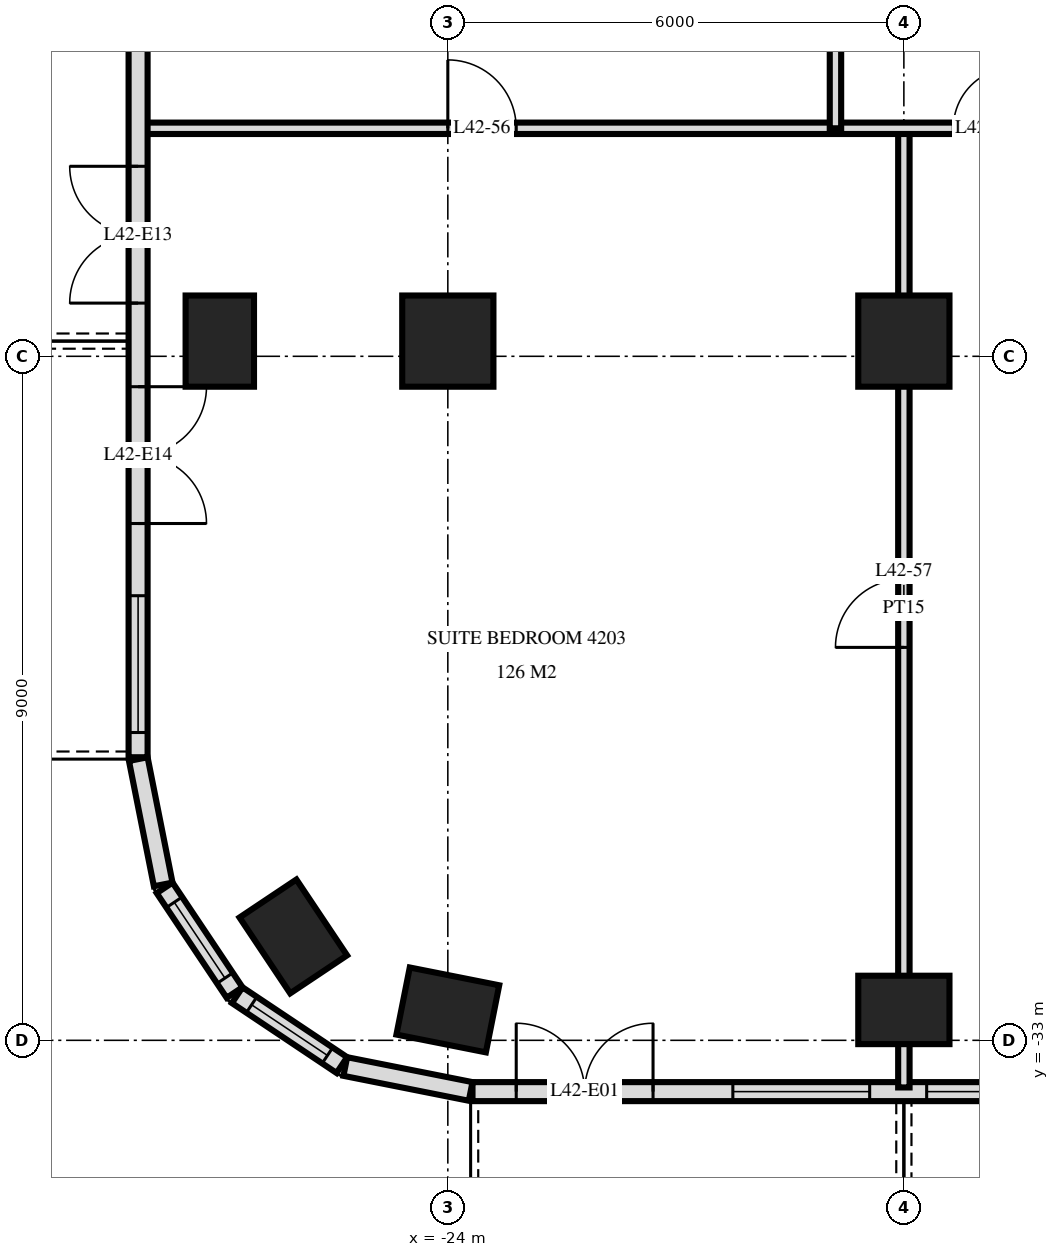
"""IFC4 building model, lengths in metres.
Left out: names, types, materials, properties, quantities, classifications, styles, units other than length and angle.
Written with IfcOpenShell. Run it as: python <this file> out.ifc"""

import sys

from ifc_helpers import new_model, si_unit, direction, frame, frame_2d, origin, origin_2d, place, context, subcontext, project, spatial, rectangle, extrude, element, fill, save


model = new_model("IFC4")
c1 = context("Model", 3, precision=1e-05, world=origin(), true_north=direction((0.0, 1.0)))
c2 = subcontext(c1, "Body", "Model", "MODEL_VIEW")
j1 = project(units=[si_unit("LENGTHUNIT", "METRE"), si_unit("PLANEANGLEUNIT", "RADIAN")], contexts=[c1])
p1 = place(None, origin())
s1 = spatial("IfcSite", under=j1, at=p1, CompositionType="ELEMENT")
p2 = place(p1, origin())
s2 = spatial("IfcBuilding", under=s1, at=p2, CompositionType="ELEMENT")
p3 = place(p2, frame((0.0, 0.0, 163.2)))
s3 = spatial("IfcBuildingStorey", under=s2, at=p3, CompositionType="ELEMENT", Elevation=163.2)
for number, where, z_axis, x_axis in (
    (1, (-27.0, -23.8, 0.0), (0.0, 0.0, 1.0), (0.0, 1.0, 0.0)),
    (2, (-26.033, -31.633, 0.0), (0.0, 0.0, 1.0), (-0.556, 0.831, 0.0)),
    (3, (-24.0, -32.6, 0.0), (0.0, 0.0, 1.0), (-0.981, 0.195, 0.0)),
):
    element("IfcColumn", number, at=place(p3, frame(where, z_axis=z_axis, x_axis=x_axis)), inside=s3, PredefinedType="COLUMN", context=c2, shape_type="SweptSolid", body=[
        extrude(rectangle(XDim=1.2, YDim=0.9, at=origin_2d()), origin(), (0.0, 0.0, 1.0), 3.6),
    ])
p4 = place(p3, frame((-24.0, -23.8, 0.0), z_axis=(0.0, 0.0, 1.0), x_axis=(1.0, 0.0, 0.0)))
e4 = element("IfcColumn", 4, at=p4, inside=s3, PredefinedType="COLUMN", context=c2, shape_type="SweptSolid", body=[
    extrude(rectangle(XDim=1.2, YDim=1.2, at=origin_2d()), origin(), (0.0, 0.0, 1.0), 3.6),
])
p5 = place(p3, frame((-18.0, -32.6, 0.0), z_axis=(0.0, 0.0, 1.0), x_axis=(1.0, 0.0, 0.0)))
e5 = element("IfcColumn", 5, at=p5, inside=s3, PredefinedType="COLUMN", context=c2, shape_type="SweptSolid", body=[
    extrude(rectangle(XDim=1.2, YDim=0.9, at=origin_2d()), origin(), (0.0, 0.0, 1.0), 3.6),
])
p6 = place(p3, frame((-18.0, -23.8, 0.0), z_axis=(0.0, 0.0, 1.0), x_axis=(1.0, 0.0, 0.0)))
e6 = element("IfcColumn", 6, at=p6, inside=s3, PredefinedType="COLUMN", context=c2, shape_type="SweptSolid", body=[
    extrude(rectangle(XDim=1.2, YDim=1.2, at=origin_2d()), origin(), (0.0, 0.0, 1.0), 3.6),
])
p7 = place(p3, frame((-28.075, -3.325, 0.0), z_axis=(0.0, 0.0, 1.0), x_axis=(0.0, -1.0, 0.0)))
e7 = element("IfcWall", 7, at=p7, inside=s3, PredefinedType="SOLIDWALL", context=c2, shape_type="SweptSolid", body=[
    extrude(rectangle(XDim=25.951, YDim=0.25, at=frame_2d((12.975, 0.0))), origin(), (0.0, 0.0, 1.0), 3.32),
])
p8 = place(p7, frame((6.65, 0.0, 0.0)))
e8 = element("IfcOpeningElement", 8, at=p8, cuts=e7, PredefinedType="OPENING", context=c2, shape_type="SweptSolid", body=[
    extrude(rectangle(XDim=1.8, YDim=2.4, at=frame_2d((0.9, 1.2))), frame((0.0, 0.135, 0.0), z_axis=(0.0, -1.0, 0.0), x_axis=(1.0, 0.0, 0.0)), (0.0, 0.0, 1.0), 0.27),
])
p9 = place(p7, frame((12.575, 0.0, 0.3)))
e9 = element("IfcOpeningElement", 9, at=p9, cuts=e7, PredefinedType="OPENING", context=c2, shape_type="SweptSolid", body=[
    extrude(rectangle(XDim=1.2, YDim=2.1, at=frame_2d((0.6, 1.05))), frame((0.0, 0.135, 0.0), z_axis=(0.0, -1.0, 0.0), x_axis=(1.0, 0.0, 0.0)), (0.0, 0.0, 1.0), 0.27),
])
p10 = place(p7, frame((18.175, 0.0, 0.0)))
e10 = element("IfcOpeningElement", 10, at=p10, cuts=e7, PredefinedType="OPENING", context=c2, shape_type="SweptSolid", body=[
    extrude(rectangle(XDim=1.8, YDim=2.4, at=frame_2d((0.9, 1.2))), frame((0.0, 0.135, 0.0), z_axis=(0.0, -1.0, 0.0), x_axis=(1.0, 0.0, 0.0)), (0.0, 0.0, 1.0), 0.27),
])
p11 = place(p7, frame((21.075, 0.0, 0.0)))
e11 = element("IfcOpeningElement", 11, at=p11, cuts=e7, PredefinedType="OPENING", context=c2, shape_type="SweptSolid", body=[
    extrude(rectangle(XDim=1.8, YDim=2.4, at=frame_2d((0.9, 1.2))), frame((0.0, 0.135, 0.0), z_axis=(0.0, -1.0, 0.0), x_axis=(1.0, 0.0, 0.0)), (0.0, 0.0, 1.0), 0.27),
])
p12 = place(p7, frame((23.825, 0.0, 0.3)))
e12 = element("IfcOpeningElement", 12, at=p12, cuts=e7, PredefinedType="OPENING", context=c2, shape_type="SweptSolid", body=[
    extrude(rectangle(XDim=1.8, YDim=2.1, at=frame_2d((0.9, 1.05))), frame((0.0, 0.135, 0.0), z_axis=(0.0, -1.0, 0.0), x_axis=(1.0, 0.0, 0.0)), (0.0, 0.0, 1.0), 0.27),
])
p13 = place(p3, frame((-28.073, -29.3, 0.0), z_axis=(0.0, 0.0, 1.0), x_axis=(0.194999110559, -0.980803419081, 0.0)))
e13 = element("IfcWall", 13, at=p13, inside=s3, PredefinedType="SOLIDWALL", context=c2, shape_type="SweptSolid", body=[
    extrude(rectangle(XDim=1.681, YDim=0.25, at=frame_2d((0.841, 0.0))), origin(), (0.0, 0.0, 1.0), 3.32),
])
p14 = place(p3, frame((-27.726, -30.994, 0.0), z_axis=(0.0, 0.0, 1.0), x_axis=(0.55555029066, -0.831482937015, 0.0)))
e14 = element("IfcWall", 14, at=p14, inside=s3, PredefinedType="SOLIDWALL", context=c2, shape_type="SweptSolid", body=[
    extrude(rectangle(XDim=1.656, YDim=0.25, at=frame_2d((0.828, 0.0))), origin(), (0.0, 0.0, 1.0), 3.32),
])
p15 = place(p14, frame((0.228, 0.0, 0.9)))
e15 = element("IfcOpeningElement", 15, at=p15, cuts=e14, PredefinedType="OPENING", context=c2, shape_type="SweptSolid", body=[
    extrude(rectangle(XDim=1.2, YDim=1.5, at=frame_2d((0.6, 0.75))), frame((0.0, 0.135, 0.0), z_axis=(0.0, -1.0, 0.0), x_axis=(1.0, 0.0, 0.0)), (0.0, 0.0, 1.0), 0.27),
])
p16 = place(p3, frame((-26.771, -32.406, 0.0), z_axis=(0.0, 0.0, 1.0), x_axis=(0.831482937015, -0.55555029066, 0.0)))
e16 = element("IfcWall", 16, at=p16, inside=s3, PredefinedType="SOLIDWALL", context=c2, shape_type="SweptSolid", body=[
    extrude(rectangle(XDim=1.656, YDim=0.25, at=frame_2d((0.828, 0.0))), origin(), (0.0, 0.0, 1.0), 3.32),
])
p17 = place(p16, frame((0.228, 0.0, 0.9)))
e17 = element("IfcOpeningElement", 17, at=p17, cuts=e16, PredefinedType="OPENING", context=c2, shape_type="SweptSolid", body=[
    extrude(rectangle(XDim=1.2, YDim=1.5, at=frame_2d((0.6, 0.75))), frame((0.0, 0.135, 0.0), z_axis=(0.0, -1.0, 0.0), x_axis=(1.0, 0.0, 0.0)), (0.0, 0.0, 1.0), 0.27),
])
p18 = place(p3, frame((-25.349, -33.344, 0.0), z_axis=(0.0, 0.0, 1.0), x_axis=(0.980775640221, -0.19513878023, 0.0)))
e18 = element("IfcWall", 18, at=p18, inside=s3, PredefinedType="SOLIDWALL", context=c2, shape_type="SweptSolid", body=[
    extrude(rectangle(XDim=1.681, YDim=0.25, at=frame_2d((0.841, 0.0))), origin(), (0.0, 0.0, 1.0), 3.32),
])
p19 = place(p3, frame((-23.675, -33.675, 0.0), z_axis=(0.0, 0.0, 1.0), x_axis=(1.0, 0.0, 0.0)))
e19 = element("IfcWall", 19, at=p19, inside=s3, PredefinedType="SOLIDWALL", context=c2, shape_type="SweptSolid", body=[
    extrude(rectangle(XDim=47.351, YDim=0.25, at=frame_2d((23.675, 0.0))), origin(), (0.0, 0.0, 1.0), 3.32),
])
p20 = place(p19, frame((0.575, 0.0, 0.0)))
e20 = element("IfcOpeningElement", 20, at=p20, cuts=e19, PredefinedType="OPENING", context=c2, shape_type="SweptSolid", body=[
    extrude(rectangle(XDim=1.8, YDim=2.4, at=frame_2d((0.9, 1.2))), frame((0.0, 0.135, 0.0), z_axis=(0.0, -1.0, 0.0), x_axis=(1.0, 0.0, 0.0)), (0.0, 0.0, 1.0), 0.27),
])
p21 = place(p19, frame((3.425, 0.0, 0.3)))
e21 = element("IfcOpeningElement", 21, at=p21, cuts=e19, PredefinedType="OPENING", context=c2, shape_type="SweptSolid", body=[
    extrude(rectangle(XDim=1.8, YDim=2.1, at=frame_2d((0.9, 1.05))), frame((0.0, 0.135, 0.0), z_axis=(0.0, -1.0, 0.0), x_axis=(1.0, 0.0, 0.0)), (0.0, 0.0, 1.0), 0.27),
])
p22 = place(p19, frame((5.975, 0.0, 0.3)))
e22 = element("IfcOpeningElement", 22, at=p22, cuts=e19, PredefinedType="OPENING", context=c2, shape_type="SweptSolid", body=[
    extrude(rectangle(XDim=2.4, YDim=2.1, at=frame_2d((1.2, 1.05))), frame((0.0, 0.135, 0.0), z_axis=(0.0, -1.0, 0.0), x_axis=(1.0, 0.0, 0.0)), (0.0, 0.0, 1.0), 0.27),
])
p23 = place(p19, frame((9.275, 0.0, 0.0)))
e23 = element("IfcOpeningElement", 23, at=p23, cuts=e19, PredefinedType="OPENING", context=c2, shape_type="SweptSolid", body=[
    extrude(rectangle(XDim=1.8, YDim=2.4, at=frame_2d((0.9, 1.2))), frame((0.0, 0.135, 0.0), z_axis=(0.0, -1.0, 0.0), x_axis=(1.0, 0.0, 0.0)), (0.0, 0.0, 1.0), 0.27),
])
p24 = place(p19, frame((12.275, 0.0, 0.0)))
e24 = element("IfcOpeningElement", 24, at=p24, cuts=e19, PredefinedType="OPENING", context=c2, shape_type="SweptSolid", body=[
    extrude(rectangle(XDim=1.8, YDim=2.4, at=frame_2d((0.9, 1.2))), frame((0.0, 0.135, 0.0), z_axis=(0.0, -1.0, 0.0), x_axis=(1.0, 0.0, 0.0)), (0.0, 0.0, 1.0), 0.27),
])
p25 = place(p19, frame((14.975, 0.0, 0.3)))
e25 = element("IfcOpeningElement", 25, at=p25, cuts=e19, PredefinedType="OPENING", context=c2, shape_type="SweptSolid", body=[
    extrude(rectangle(XDim=2.4, YDim=2.1, at=frame_2d((1.2, 1.05))), frame((0.0, 0.135, 0.0), z_axis=(0.0, -1.0, 0.0), x_axis=(1.0, 0.0, 0.0)), (0.0, 0.0, 1.0), 0.27),
])
p26 = place(p19, frame((17.975, 0.0, 0.3)))
e26 = element("IfcOpeningElement", 26, at=p26, cuts=e19, PredefinedType="OPENING", context=c2, shape_type="SweptSolid", body=[
    extrude(rectangle(XDim=2.4, YDim=2.1, at=frame_2d((1.2, 1.05))), frame((0.0, 0.135, 0.0), z_axis=(0.0, -1.0, 0.0), x_axis=(1.0, 0.0, 0.0)), (0.0, 0.0, 1.0), 0.27),
])
p27 = place(p19, frame((21.275, 0.0, 0.0)))
e27 = element("IfcOpeningElement", 27, at=p27, cuts=e19, PredefinedType="OPENING", context=c2, shape_type="SweptSolid", body=[
    extrude(rectangle(XDim=1.8, YDim=2.4, at=frame_2d((0.9, 1.2))), frame((0.0, 0.135, 0.0), z_axis=(0.0, -1.0, 0.0), x_axis=(1.0, 0.0, 0.0)), (0.0, 0.0, 1.0), 0.27),
])
p28 = place(p19, frame((24.275, 0.0, 0.0)))
e28 = element("IfcOpeningElement", 28, at=p28, cuts=e19, PredefinedType="OPENING", context=c2, shape_type="SweptSolid", body=[
    extrude(rectangle(XDim=1.8, YDim=2.4, at=frame_2d((0.9, 1.2))), frame((0.0, 0.135, 0.0), z_axis=(0.0, -1.0, 0.0), x_axis=(1.0, 0.0, 0.0)), (0.0, 0.0, 1.0), 0.27),
])
p29 = place(p19, frame((26.975, 0.0, 0.3)))
e29 = element("IfcOpeningElement", 29, at=p29, cuts=e19, PredefinedType="OPENING", context=c2, shape_type="SweptSolid", body=[
    extrude(rectangle(XDim=2.4, YDim=2.1, at=frame_2d((1.2, 1.05))), frame((0.0, 0.135, 0.0), z_axis=(0.0, -1.0, 0.0), x_axis=(1.0, 0.0, 0.0)), (0.0, 0.0, 1.0), 0.27),
])
p30 = place(p19, frame((30.275, 0.0, 0.0)))
e30 = element("IfcOpeningElement", 30, at=p30, cuts=e19, PredefinedType="OPENING", context=c2, shape_type="SweptSolid", body=[
    extrude(rectangle(XDim=1.8, YDim=2.4, at=frame_2d((0.9, 1.2))), frame((0.0, 0.135, 0.0), z_axis=(0.0, -1.0, 0.0), x_axis=(1.0, 0.0, 0.0)), (0.0, 0.0, 1.0), 0.27),
])
p31 = place(p19, frame((32.975, 0.0, 0.3)))
e31 = element("IfcOpeningElement", 31, at=p31, cuts=e19, PredefinedType="OPENING", context=c2, shape_type="SweptSolid", body=[
    extrude(rectangle(XDim=2.4, YDim=2.1, at=frame_2d((1.2, 1.05))), frame((0.0, 0.135, 0.0), z_axis=(0.0, -1.0, 0.0), x_axis=(1.0, 0.0, 0.0)), (0.0, 0.0, 1.0), 0.27),
])
p32 = place(p19, frame((36.275, 0.0, 0.0)))
e32 = element("IfcOpeningElement", 32, at=p32, cuts=e19, PredefinedType="OPENING", context=c2, shape_type="SweptSolid", body=[
    extrude(rectangle(XDim=1.8, YDim=2.4, at=frame_2d((0.9, 1.2))), frame((0.0, 0.135, 0.0), z_axis=(0.0, -1.0, 0.0), x_axis=(1.0, 0.0, 0.0)), (0.0, 0.0, 1.0), 0.27),
])
p33 = place(p19, frame((38.975, 0.0, 0.3)))
e33 = element("IfcOpeningElement", 33, at=p33, cuts=e19, PredefinedType="OPENING", context=c2, shape_type="SweptSolid", body=[
    extrude(rectangle(XDim=2.4, YDim=2.1, at=frame_2d((1.2, 1.05))), frame((0.0, 0.135, 0.0), z_axis=(0.0, -1.0, 0.0), x_axis=(1.0, 0.0, 0.0)), (0.0, 0.0, 1.0), 0.27),
])
p34 = place(p19, frame((41.975, 0.0, 0.3)))
e34 = element("IfcOpeningElement", 34, at=p34, cuts=e19, PredefinedType="OPENING", context=c2, shape_type="SweptSolid", body=[
    extrude(rectangle(XDim=2.4, YDim=2.1, at=frame_2d((1.2, 1.05))), frame((0.0, 0.135, 0.0), z_axis=(0.0, -1.0, 0.0), x_axis=(1.0, 0.0, 0.0)), (0.0, 0.0, 1.0), 0.27),
])
p35 = place(p19, frame((45.125, 0.0, 0.0)))
e35 = element("IfcOpeningElement", 35, at=p35, cuts=e19, PredefinedType="OPENING", context=c2, shape_type="SweptSolid", body=[
    extrude(rectangle(XDim=1.8, YDim=2.4, at=frame_2d((0.9, 1.2))), frame((0.0, 0.135, 0.0), z_axis=(0.0, -1.0, 0.0), x_axis=(1.0, 0.0, 0.0)), (0.0, 0.0, 1.0), 0.27),
])
p36 = place(p3, frame((-18.0, -33.62, 0.0), z_axis=(0.0, 0.0, 1.0), x_axis=(0.0, 1.0, 0.0)))
e36 = element("IfcWall", 36, at=p36, inside=s3, PredefinedType="PARTITIONING", context=c2, shape_type="SweptSolid", body=[
    extrude(rectangle(XDim=12.62, YDim=0.15, at=frame_2d((6.31, 0.0))), origin(), (0.0, 0.0, 1.0), 3.32),
])
p37 = place(p36, frame((5.79, 0.0, 0.0)))
e37 = element("IfcOpeningElement", 37, at=p37, cuts=e36, PredefinedType="OPENING", context=c2, shape_type="SweptSolid", body=[
    extrude(rectangle(XDim=0.9, YDim=2.1, at=frame_2d((0.45, 1.05))), frame((0.0, 0.085, 0.0), z_axis=(0.0, -1.0, 0.0), x_axis=(1.0, 0.0, 0.0)), (0.0, 0.0, 1.0), 0.17),
])
p38 = place(p3, frame((-18.9, -21.0, 0.0), z_axis=(0.0, 0.0, 1.0), x_axis=(0.0, 1.0, 0.0)))
e38 = element("IfcWall", 38, at=p38, inside=s3, PredefinedType="PARTITIONING", context=c2, shape_type="SweptSolid", body=[
    extrude(rectangle(XDim=3.0, YDim=0.15, at=frame_2d((1.5, 0.0))), origin(), (0.0, 0.0, 1.0), 3.32),
])
p39 = place(p3, frame((-28.02, -21.0, 0.0), z_axis=(0.0, 0.0, 1.0), x_axis=(1.0, 0.0, 0.0)))
e39 = element("IfcWall", 39, at=p39, inside=s3, PredefinedType="PARTITIONING", context=c2, shape_type="SweptSolid", body=[
    extrude(rectangle(XDim=12.12, YDim=0.15, at=frame_2d((6.06, 0.0))), origin(), (0.0, 0.0, 1.0), 3.32),
])
p40 = place(p39, frame((10.67, 0.0, 0.0)))
e40 = element("IfcOpeningElement", 40, at=p40, cuts=e39, PredefinedType="OPENING", context=c2, shape_type="SweptSolid", body=[
    extrude(rectangle(XDim=0.8, YDim=2.1, at=frame_2d((0.4, 1.05))), frame((0.0, 0.085, 0.0), z_axis=(0.0, -1.0, 0.0), x_axis=(1.0, 0.0, 0.0)), (0.0, 0.0, 1.0), 0.17),
])
p41 = place(p39, frame((4.02, 0.0, 0.0)))
e41 = element("IfcOpeningElement", 41, at=p41, cuts=e39, PredefinedType="OPENING", context=c2, shape_type="SweptSolid", body=[
    extrude(rectangle(XDim=0.9, YDim=2.1, at=frame_2d((0.45, 1.05))), frame((0.0, 0.085, 0.0), z_axis=(0.0, -1.0, 0.0), x_axis=(1.0, 0.0, 0.0)), (0.0, 0.0, 1.0), 0.17),
])
p42 = place(p15, origin())
e42 = element("IfcWindow", 42, at=p42, inside=s3, PartitioningType="SINGLE_PANEL", PredefinedType="WINDOW", context=c2, shape_type="SweptSolid", body=[
    extrude(rectangle(XDim=1.2, YDim=1.5, at=frame_2d((0.6, 0.75))), frame((0.0, 0.03, 0.0), z_axis=(0.0, -1.0, 0.0), x_axis=(1.0, 0.0, 0.0)), (0.0, 0.0, 1.0), 0.06),
])
fill(e15, e42)
p43 = place(p17, origin())
e43 = element("IfcWindow", 43, at=p43, inside=s3, PartitioningType="SINGLE_PANEL", PredefinedType="WINDOW", context=c2, shape_type="SweptSolid", body=[
    extrude(rectangle(XDim=1.2, YDim=1.5, at=frame_2d((0.6, 0.75))), frame((0.0, 0.03, 0.0), z_axis=(0.0, -1.0, 0.0), x_axis=(1.0, 0.0, 0.0)), (0.0, 0.0, 1.0), 0.06),
])
fill(e17, e43)
p44 = place(p20, origin())
e44 = element("IfcDoor", 44, at=p44, inside=s3, OperationType="DOUBLE_DOOR_SINGLE_SWING", PredefinedType="DOOR", context=c2, shape_type="SweptSolid", body=[
    extrude(rectangle(XDim=1.8, YDim=2.4, at=frame_2d((0.9, 1.2))), frame((0.0, 0.025, 0.0), z_axis=(0.0, -1.0, 0.0), x_axis=(1.0, 0.0, 0.0)), (0.0, 0.0, 1.0), 0.05),
])
fill(e20, e44)
p45 = place(p21, origin())
e45 = element("IfcWindow", 45, at=p45, inside=s3, PartitioningType="SINGLE_PANEL", PredefinedType="WINDOW", context=c2, shape_type="SweptSolid", body=[
    extrude(rectangle(XDim=1.8, YDim=2.1, at=frame_2d((0.9, 1.05))), frame((0.0, 0.03, 0.0), z_axis=(0.0, -1.0, 0.0), x_axis=(1.0, 0.0, 0.0)), (0.0, 0.0, 1.0), 0.06),
])
fill(e21, e45)
p46 = place(p22, origin())
e46 = element("IfcWindow", 46, at=p46, inside=s3, PartitioningType="SINGLE_PANEL", PredefinedType="WINDOW", context=c2, shape_type="SweptSolid", body=[
    extrude(rectangle(XDim=2.4, YDim=2.1, at=frame_2d((1.2, 1.05))), frame((0.0, 0.03, 0.0), z_axis=(0.0, -1.0, 0.0), x_axis=(1.0, 0.0, 0.0)), (0.0, 0.0, 1.0), 0.06),
])
fill(e22, e46)
p47 = place(p10, frame((0.9, 0.0, 0.0), z_axis=(0.0, 0.0, 1.0), x_axis=(-1.0, 0.0, 0.0)))
e47 = element("IfcDoor", 47, at=p47, inside=s3, OperationType="DOUBLE_DOOR_SINGLE_SWING", PredefinedType="DOOR", context=c2, shape_type="SweptSolid", body=[
    extrude(rectangle(XDim=1.8, YDim=2.4, at=frame_2d((0.0, 1.2))), frame((0.0, -0.025, 0.0), z_axis=(0.0, 1.0, 0.0), x_axis=(-1.0, 0.0, 0.0)), (0.0, 0.0, 1.0), 0.05),
])
fill(e10, e47)
p48 = place(p11, origin())
e48 = element("IfcDoor", 48, at=p48, inside=s3, OperationType="DOUBLE_DOOR_SINGLE_SWING", PredefinedType="DOOR", context=c2, shape_type="SweptSolid", body=[
    extrude(rectangle(XDim=1.8, YDim=2.4, at=frame_2d((0.9, 1.2))), frame((0.0, 0.025, 0.0), z_axis=(0.0, -1.0, 0.0), x_axis=(1.0, 0.0, 0.0)), (0.0, 0.0, 1.0), 0.05),
])
fill(e11, e48)
p49 = place(p12, origin())
e49 = element("IfcWindow", 49, at=p49, inside=s3, PartitioningType="SINGLE_PANEL", PredefinedType="WINDOW", context=c2, shape_type="SweptSolid", body=[
    extrude(rectangle(XDim=1.8, YDim=2.1, at=frame_2d((0.9, 1.05))), frame((0.0, 0.03, 0.0), z_axis=(0.0, -1.0, 0.0), x_axis=(1.0, 0.0, 0.0)), (0.0, 0.0, 1.0), 0.06),
])
fill(e12, e49)
p50 = place(p40, origin())
e50 = element("IfcDoor", 50, at=p50, inside=s3, OperationType="SINGLE_SWING_LEFT", PredefinedType="DOOR", context=c2, shape_type="SweptSolid", body=[
    extrude(rectangle(XDim=0.8, YDim=2.1, at=frame_2d((0.4, 1.05))), frame((0.0, 0.025, 0.0), z_axis=(0.0, -1.0, 0.0), x_axis=(1.0, 0.0, 0.0)), (0.0, 0.0, 1.0), 0.05),
])
fill(e40, e50)
p51 = place(p41, origin())
e51 = element("IfcDoor", 51, at=p51, inside=s3, OperationType="SINGLE_SWING_RIGHT", PredefinedType="DOOR", context=c2, shape_type="SweptSolid", body=[
    extrude(rectangle(XDim=0.9, YDim=2.1, at=frame_2d((0.45, 1.05))), frame((0.0, 0.025, 0.0), z_axis=(0.0, -1.0, 0.0), x_axis=(1.0, 0.0, 0.0)), (0.0, 0.0, 1.0), 0.05),
])
fill(e41, e51)
p52 = place(p37, origin())
e52 = element("IfcDoor", 52, at=p52, inside=s3, OperationType="SINGLE_SWING_RIGHT", PredefinedType="DOOR", context=c2, shape_type="SweptSolid", body=[
    extrude(rectangle(XDim=0.9, YDim=2.1, at=frame_2d((0.45, 1.05))), frame((0.0, 0.025, 0.0), z_axis=(0.0, -1.0, 0.0), x_axis=(1.0, 0.0, 0.0)), (0.0, 0.0, 1.0), 0.05),
])
fill(e37, e52)
save(model, sys.argv[1])
